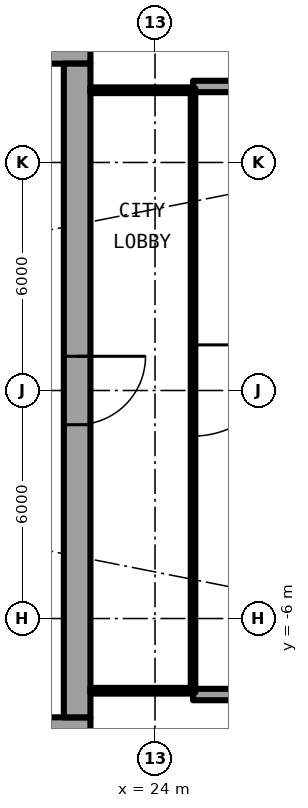
"""IFC4 building model, lengths in metres.
Left out: names, types, materials, properties, quantities, classifications, styles, units other than length and angle.
Written with IfcOpenShell. Run it as: python <this file> out.ifc"""

import sys

from ifc_helpers import new_model, si_unit, direction, frame, frame_2d, origin, place, context, subcontext, project, spatial, rectangle, extrude, element, fill, save


model = new_model("IFC4")
c1 = context("Model", 3, precision=1e-05, world=origin(), true_north=direction((0.0, 1.0)))
c2 = subcontext(c1, "Body", "Model", "MODEL_VIEW")
j1 = project(units=[si_unit("LENGTHUNIT", "METRE"), si_unit("PLANEANGLEUNIT", "RADIAN")], contexts=[c1])
p1 = place(None, origin())
s1 = spatial("IfcSite", under=j1, at=p1, CompositionType="ELEMENT")
p2 = place(p1, origin())
s2 = spatial("IfcBuilding", under=s1, at=p2, CompositionType="ELEMENT")
p3 = place(p2, frame((0.0, 0.0, 63.6)))
s3 = spatial("IfcBuildingStorey", under=s2, at=p3, CompositionType="ELEMENT", Elevation=63.6)
for number, where, z_axis, x_axis in (
    (1, (25.0, 8.0, 0.0), (0.0, 0.0, 1.0), (1.0, 0.0, 0.0)),
    (2, (25.0, -8.0, 0.0), (0.0, 0.0, 1.0), (1.0, 0.0, 0.0)),
):
    element("IfcWall", number, at=place(p3, frame(where, z_axis=z_axis, x_axis=x_axis)), inside=s3, PredefinedType="SOLIDWALL", context=c2, shape_type="SweptSolid", body=[
        extrude(rectangle(XDim=2.667, YDim=0.3, at=frame_2d((1.333, 0.0))), origin(), (0.0, 0.0, 1.0), 2.7),
    ])
p4 = place(p3, frame((22.3, 8.95, 0.0), z_axis=(0.0, 0.0, 1.0), x_axis=(-1.0, 0.0, 0.0)))
e3 = element("IfcWall", 3, at=p4, inside=s3, PredefinedType="SHEAR", context=c2, shape_type="SweptSolid", body=[
    extrude(rectangle(XDim=14.0, YDim=0.7, at=frame_2d((7.0, 0.0))), origin(), (0.0, 0.0, 1.0), 3.05),
])
p5 = place(p4, frame((1.225, 0.0, 0.0)))
e4 = element("IfcOpeningElement", 4, at=p5, cuts=e3, PredefinedType="OPENING", context=c2, shape_type="SweptSolid", body=[
    extrude(rectangle(XDim=1.2, YDim=2.3, at=frame_2d((0.6, 1.15))), frame((0.0, 0.36, 0.0), z_axis=(0.0, -1.0, 0.0), x_axis=(1.0, 0.0, 0.0)), (0.0, 0.0, 1.0), 0.72),
])
p6 = place(p3, frame((8.3, -8.95, 0.0), z_axis=(0.0, 0.0, 1.0), x_axis=(1.0, 0.0, 0.0)))
e5 = element("IfcWall", 5, at=p6, inside=s3, PredefinedType="SHEAR", context=c2, shape_type="SweptSolid", body=[
    extrude(rectangle(XDim=14.0, YDim=0.7, at=frame_2d((7.0, 0.0))), origin(), (0.0, 0.0, 1.0), 3.05),
])
p7 = place(p6, frame((11.575, 0.0, 0.0)))
e6 = element("IfcOpeningElement", 6, at=p7, cuts=e5, PredefinedType="OPENING", context=c2, shape_type="SweptSolid", body=[
    extrude(rectangle(XDim=1.2, YDim=2.3, at=frame_2d((0.6, 1.15))), frame((0.0, 0.36, 0.0), z_axis=(0.0, -1.0, 0.0), x_axis=(1.0, 0.0, 0.0)), (0.0, 0.0, 1.0), 0.72),
])
p8 = place(p3, frame((21.95, 8.6, 0.0), z_axis=(0.0, 0.0, 1.0), x_axis=(0.0, -1.0, 0.0)))
e7 = element("IfcWall", 7, at=p8, inside=s3, PredefinedType="SHEAR", context=c2, shape_type="SweptSolid", body=[
    extrude(rectangle(XDim=17.2, YDim=0.7, at=frame_2d((8.6, 0.0))), origin(), (0.0, 0.0, 1.0), 3.05),
])
p9 = place(p8, frame((7.7, 0.0, 0.0)))
e8 = element("IfcOpeningElement", 8, at=p9, cuts=e7, PredefinedType="OPENING", context=c2, shape_type="SweptSolid", body=[
    extrude(rectangle(XDim=1.8, YDim=2.3, at=frame_2d((0.9, 1.15))), frame((0.0, 0.36, 0.0), z_axis=(0.0, -1.0, 0.0), x_axis=(1.0, 0.0, 0.0)), (0.0, 0.0, 1.0), 0.72),
])
for number, where, z_axis, x_axis in (
    (9, (22.3, -7.9, 0.0), (0.0, 0.0, 1.0), (1.0, 0.0, 0.0)),
    (10, (22.3, 7.9, 0.0), (0.0, 0.0, 1.0), (1.0, 0.0, 0.0)),
):
    element("IfcWall", number, at=place(p3, frame(where, z_axis=z_axis, x_axis=x_axis)), inside=s3, PredefinedType="PARTITIONING", context=c2, shape_type="SweptSolid", body=[
        extrude(rectangle(XDim=2.64, YDim=0.15, at=frame_2d((1.32, 0.0))), origin(), (0.0, 0.0, 1.0), 2.7),
    ])
p10 = place(p3, frame((25.0, 7.95, 0.0), z_axis=(0.0, 0.0, 1.0), x_axis=(0.0, -1.0, 0.0)))
e11 = element("IfcWall", 11, at=p10, inside=s3, PredefinedType="PARTITIONING", context=c2, shape_type="SweptSolid", body=[
    extrude(rectangle(XDim=15.9, YDim=0.12, at=frame_2d((7.95, 0.0))), origin(), (0.0, 0.0, 1.0), 2.7),
])
p11 = place(p10, frame((6.75, 0.0, 0.0)))
e12 = element("IfcOpeningElement", 12, at=p11, cuts=e11, PredefinedType="OPENING", context=c2, shape_type="SweptSolid", body=[
    extrude(rectangle(XDim=2.4, YDim=2.3, at=frame_2d((1.2, 1.15))), frame((0.0, 0.07, 0.0), z_axis=(0.0, -1.0, 0.0), x_axis=(1.0, 0.0, 0.0)), (0.0, 0.0, 1.0), 0.14),
])
p12 = place(p10, frame((11.55, 0.0, 0.1)))
e13 = element("IfcOpeningElement", 13, at=p12, cuts=e11, PredefinedType="OPENING", context=c2, shape_type="SweptSolid", body=[
    extrude(rectangle(XDim=3.4, YDim=2.35, at=frame_2d((1.7, 1.175))), frame((0.0, 0.07, 0.0), z_axis=(0.0, -1.0, 0.0), x_axis=(1.0, 0.0, 0.0)), (0.0, 0.0, 1.0), 0.14),
])
p13 = place(p10, frame((0.95, 0.0, 0.1)))
e14 = element("IfcOpeningElement", 14, at=p13, cuts=e11, PredefinedType="OPENING", context=c2, shape_type="SweptSolid", body=[
    extrude(rectangle(XDim=3.4, YDim=2.35, at=frame_2d((1.7, 1.175))), frame((0.0, 0.07, 0.0), z_axis=(0.0, -1.0, 0.0), x_axis=(1.0, 0.0, 0.0)), (0.0, 0.0, 1.0), 0.14),
])
p14 = place(p9, origin())
e15 = element("IfcDoor", 15, at=p14, inside=s3, OperationType="SINGLE_SWING_LEFT", PredefinedType="DOOR", context=c2, shape_type="SweptSolid", body=[
    extrude(rectangle(XDim=1.8, YDim=2.3, at=frame_2d((0.9, 1.15))), frame((0.0, 0.025, 0.0), z_axis=(0.0, -1.0, 0.0), x_axis=(1.0, 0.0, 0.0)), (0.0, 0.0, 1.0), 0.05),
])
fill(e8, e15)
p15 = place(p11, origin())
e16 = element("IfcDoor", 16, at=p15, inside=s3, OperationType="SINGLE_SWING_LEFT", PredefinedType="DOOR", context=c2, shape_type="SweptSolid", body=[
    extrude(rectangle(XDim=2.4, YDim=2.3, at=frame_2d((1.2, 1.15))), frame((0.0, 0.025, 0.0), z_axis=(0.0, -1.0, 0.0), x_axis=(1.0, 0.0, 0.0)), (0.0, 0.0, 1.0), 0.05),
])
fill(e12, e16)
p16 = place(p12, origin())
e17 = element("IfcWindow", 17, at=p16, inside=s3, PartitioningType="SINGLE_PANEL", PredefinedType="WINDOW", context=c2, shape_type="SweptSolid", body=[
    extrude(rectangle(XDim=3.4, YDim=2.35, at=frame_2d((1.7, 1.175))), frame((0.0, 0.03, 0.0), z_axis=(0.0, -1.0, 0.0), x_axis=(1.0, 0.0, 0.0)), (0.0, 0.0, 1.0), 0.06),
])
fill(e13, e17)
p17 = place(p13, origin())
e18 = element("IfcWindow", 18, at=p17, inside=s3, PartitioningType="SINGLE_PANEL", PredefinedType="WINDOW", context=c2, shape_type="SweptSolid", body=[
    extrude(rectangle(XDim=3.4, YDim=2.35, at=frame_2d((1.7, 1.175))), frame((0.0, 0.03, 0.0), z_axis=(0.0, -1.0, 0.0), x_axis=(1.0, 0.0, 0.0)), (0.0, 0.0, 1.0), 0.06),
])
fill(e14, e18)
save(model, sys.argv[1])
